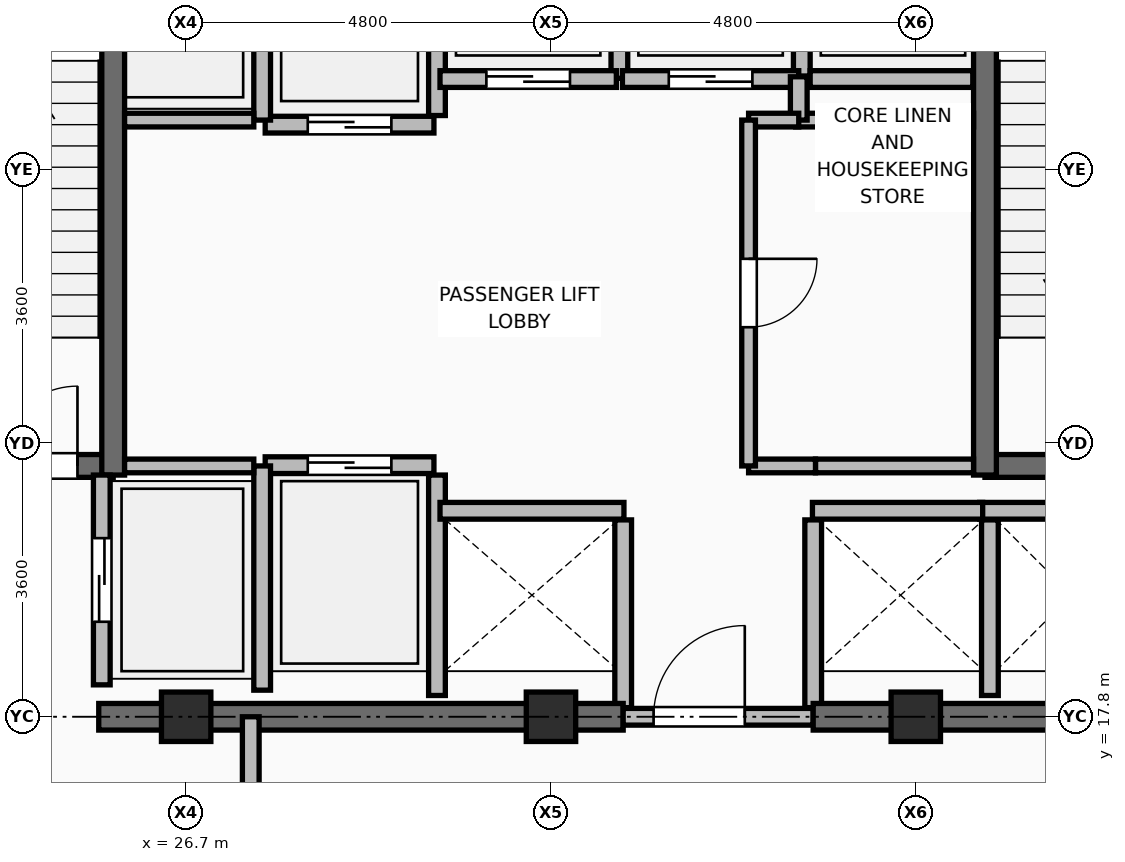
"""IFC4 building model, lengths in metres.
Left out: names, types, materials, properties, quantities, classifications, styles, units other than length and angle.
Written with IfcOpenShell. Run it as: python <this file> out.ifc"""

import sys

from ifc_helpers import new_model, si_unit, direction, frame, frame_2d, origin, origin_2d, place, context, subcontext, project, spatial, rectangle, extrude, element, fill, save


model = new_model("IFC4")
c1 = context("Model", 3, precision=1e-05, world=origin(), true_north=direction((0.0, 1.0)))
c2 = subcontext(c1, "Body", "Model", "MODEL_VIEW")
j1 = project(units=[si_unit("LENGTHUNIT", "METRE"), si_unit("PLANEANGLEUNIT", "RADIAN")], contexts=[c1])
p1 = place(None, origin())
s1 = spatial("IfcSite", under=j1, at=p1, CompositionType="ELEMENT")
p2 = place(p1, origin())
s2 = spatial("IfcBuilding", under=s1, at=p2, CompositionType="ELEMENT")
p3 = place(p2, frame((0.0, 0.0, 259.05)))
s3 = spatial("IfcBuildingStorey", under=s2, at=p3, CompositionType="ELEMENT", Elevation=259.05)
for number, where, z_axis, x_axis in (
    (1, (26.7, 17.8, 0.0), (0.0, 0.0, 1.0), (1.0, 0.0, 0.0)),
    (2, (31.5, 17.8, 0.0), (0.0, 0.0, 1.0), (1.0, 0.0, 0.0)),
    (3, (36.3, 17.8, 0.0), (0.0, 0.0, 1.0), (1.0, 0.0, 0.0)),
):
    element("IfcColumn", number, at=place(p3, frame(where, z_axis=z_axis, x_axis=x_axis)), inside=s3, PredefinedType="COLUMN", context=c2, shape_type="SweptSolid", body=[
        extrude(rectangle(XDim=0.65, YDim=0.65, at=origin_2d()), origin(), (0.0, 0.0, 1.0), 4.8),
    ])
p4 = place(p3, frame((30.0, 18.08, 0.0), z_axis=(0.0, 0.0, 1.0), x_axis=(0.0, 1.0, 0.0)))
e4 = element("IfcWall", 4, at=p4, inside=s3, PredefinedType="PARTITIONING", context=c2, shape_type="SweptSolid", body=[
    extrude(rectangle(XDim=2.9, YDim=0.22, at=frame_2d((1.45, 0.0))), origin(), (0.0, 0.0, 1.0), 4.595),
])
for number, where, z_axis, x_axis in (
    (5, (32.45, 17.92, 0.0), (0.0, 0.0, 1.0), (0.0, 1.0, 0.0)),
    (6, (34.95, 17.92, 0.0), (0.0, 0.0, 1.0), (0.0, 1.0, 0.0)),
):
    element("IfcWall", number, at=place(p3, frame(where, z_axis=z_axis, x_axis=x_axis)), inside=s3, PredefinedType="PARTITIONING", context=c2, shape_type="SweptSolid", body=[
        extrude(rectangle(XDim=2.47, YDim=0.22, at=frame_2d((1.235, 0.0))), origin(), (0.0, 0.0, 1.0), 4.595),
    ])
p5 = place(p3, frame((37.275, 18.08, 0.0), z_axis=(0.0, 0.0, 1.0), x_axis=(0.0, 1.0, 0.0)))
e7 = element("IfcWall", 7, at=p5, inside=s3, PredefinedType="PARTITIONING", context=c2, shape_type="SweptSolid", body=[
    extrude(rectangle(XDim=2.31, YDim=0.22, at=frame_2d((1.155, 0.0))), origin(), (0.0, 0.0, 1.0), 4.595),
])
p6 = place(p3, frame((30.0, 25.71, 0.0), z_axis=(0.0, 0.0, 1.0), x_axis=(0.0, 1.0, 0.0)))
e8 = element("IfcWall", 8, at=p6, inside=s3, PredefinedType="PARTITIONING", context=c2, shape_type="SweptSolid", body=[
    extrude(rectangle(XDim=2.73, YDim=0.22, at=frame_2d((1.365, 0.0))), origin(), (0.0, 0.0, 1.0), 4.595),
])
p7 = place(p3, frame((32.4, 26.2, 0.0), z_axis=(0.0, 0.0, 1.0), x_axis=(0.0, 1.0, 0.0)))
e9 = element("IfcWall", 9, at=p7, inside=s3, PredefinedType="PARTITIONING", context=c2, shape_type="SweptSolid", body=[
    extrude(rectangle(XDim=2.24, YDim=0.22, at=frame_2d((1.12, 0.0))), origin(), (0.0, 0.0, 1.0), 4.595),
])
p8 = place(p3, frame((34.8, 26.23, 0.0), z_axis=(0.0, 0.0, 1.0), x_axis=(0.0, 1.0, 0.0)))
e10 = element("IfcWall", 10, at=p8, inside=s3, PredefinedType="PARTITIONING", context=c2, shape_type="SweptSolid", body=[
    extrude(rectangle(XDim=2.21, YDim=0.22, at=frame_2d((1.105, 0.0))), origin(), (0.0, 0.0, 1.0), 4.595),
])
p9 = place(p3, frame((34.91, 26.19, 0.0), z_axis=(0.0, 0.0, 1.0), x_axis=(1.0, 0.0, 0.0)))
e11 = element("IfcWall", 11, at=p9, inside=s3, PredefinedType="PARTITIONING", context=c2, shape_type="SweptSolid", body=[
    extrude(rectangle(XDim=2.14, YDim=0.22, at=frame_2d((1.07, 0.0))), origin(), (0.0, 0.0, 1.0), 4.595),
])
p10 = place(p3, frame((25.55, 17.8, 0.0), z_axis=(0.0, 0.0, 1.0), x_axis=(1.0, 0.0, 0.0)))
e12 = element("IfcWall", 12, at=p10, inside=s3, PredefinedType="SHEAR", context=c2, shape_type="SweptSolid", body=[
    extrude(rectangle(XDim=6.9, YDim=0.35, at=frame_2d((3.45, 0.0))), origin(), (0.0, 0.0, 1.0), 4.62),
])
p11 = place(p3, frame((32.45, 17.8, 0.0), z_axis=(0.0, 0.0, 1.0), x_axis=(1.0, 0.0, 0.0)))
e13 = element("IfcWall", 13, at=p11, inside=s3, PredefinedType="PARTITIONING", context=c2, shape_type="SweptSolid", body=[
    extrude(rectangle(XDim=2.5, YDim=0.22, at=frame_2d((1.25, 0.0))), origin(), (0.0, 0.0, 1.0), 4.182),
])
p12 = place(p11, frame((0.4, 0.0, 0.0)))
e14 = element("IfcOpeningElement", 14, at=p12, cuts=e13, PredefinedType="OPENING", context=c2, shape_type="SweptSolid", body=[
    extrude(rectangle(XDim=1.2, YDim=2.1, at=frame_2d((0.6, 1.05))), frame((0.0, 0.12, 0.0), z_axis=(0.0, -1.0, 0.0), x_axis=(1.0, 0.0, 0.0)), (0.0, 0.0, 1.0), 0.24),
])
p13 = place(p3, frame((34.95, 17.8, 0.0), z_axis=(0.0, 0.0, 1.0), x_axis=(1.0, 0.0, 0.0)))
e15 = element("IfcWall", 15, at=p13, inside=s3, PredefinedType="SHEAR", context=c2, shape_type="SweptSolid", body=[
    extrude(rectangle(XDim=6.325, YDim=0.35, at=frame_2d((3.163, 0.0))), origin(), (0.0, 0.0, 1.0), 4.62),
])
p14 = place(p3, frame((22.075, 21.1, 0.0), z_axis=(0.0, 0.0, 1.0), x_axis=(1.0, 0.0, 0.0)))
e16 = element("IfcWall", 16, at=p14, inside=s3, PredefinedType="SHEAR", context=c2, shape_type="SweptSolid", body=[
    extrude(rectangle(XDim=3.665, YDim=0.3, at=frame_2d((1.833, 0.0))), origin(), (0.0, 0.0, 1.0), 4.62),
])
p15 = place(p14, frame((2.145, 0.0, 0.0)))
e17 = element("IfcOpeningElement", 17, at=p15, cuts=e16, PredefinedType="OPENING", context=c2, shape_type="SweptSolid", body=[
    extrude(rectangle(XDim=1.05, YDim=2.1, at=frame_2d((0.525, 1.05))), frame((0.0, 0.16, 0.0), z_axis=(0.0, -1.0, 0.0), x_axis=(1.0, 0.0, 0.0)), (0.0, 0.0, 1.0), 0.32),
])
p16 = place(p3, frame((25.74, 20.98, 0.0), z_axis=(0.0, 0.0, 1.0), x_axis=(0.0, 1.0, 0.0)))
e18 = element("IfcWall", 18, at=p16, inside=s3, PredefinedType="SHEAR", context=c2, shape_type="SweptSolid", body=[
    extrude(rectangle(XDim=7.99, YDim=0.3, at=frame_2d((3.995, 0.0))), origin(), (0.0, 0.0, 1.0), 4.62),
])
p17 = place(p3, frame((37.21, 21.1, 0.0), z_axis=(0.0, 0.0, 1.0), x_axis=(1.0, 0.0, 0.0)))
e19 = element("IfcWall", 19, at=p17, inside=s3, PredefinedType="SHEAR", context=c2, shape_type="SweptSolid", body=[
    extrude(rectangle(XDim=3.715, YDim=0.3, at=frame_2d((1.857, 0.0))), origin(), (0.0, 0.0, 1.0), 4.62),
])
p18 = place(p3, frame((37.21, 20.98, 0.0), z_axis=(0.0, 0.0, 1.0), x_axis=(0.0, 1.0, 0.0)))
e20 = element("IfcWall", 20, at=p18, inside=s3, PredefinedType="SHEAR", context=c2, shape_type="SweptSolid", body=[
    extrude(rectangle(XDim=7.99, YDim=0.3, at=frame_2d((3.995, 0.0))), origin(), (0.0, 0.0, 1.0), 4.62),
])
p19 = place(p3, frame((25.59, 18.22, 0.0), z_axis=(0.0, 0.0, 1.0), x_axis=(0.0, 1.0, 0.0)))
e21 = element("IfcWall", 21, at=p19, inside=s3, PredefinedType="PARTITIONING", context=c2, shape_type="SweptSolid", body=[
    extrude(rectangle(XDim=2.76, YDim=0.22, at=frame_2d((1.38, 0.0))), origin(), (0.0, 0.0, 1.0), 4.6),
])
p20 = place(p19, frame((0.83, 0.0, 0.0)))
e22 = element("IfcOpeningElement", 22, at=p20, cuts=e21, PredefinedType="OPENING", context=c2, shape_type="SweptSolid", body=[
    extrude(rectangle(XDim=1.1, YDim=2.2, at=frame_2d((0.55, 1.1))), frame((0.0, 0.12, 0.0), z_axis=(0.0, -1.0, 0.0), x_axis=(1.0, 0.0, 0.0)), (0.0, 0.0, 1.0), 0.24),
])
p21 = place(p3, frame((27.74, 21.11, 0.0), z_axis=(0.0, 0.0, 1.0), x_axis=(1.0, 0.0, 0.0)))
e23 = element("IfcWall", 23, at=p21, inside=s3, PredefinedType="PARTITIONING", context=c2, shape_type="SweptSolid", body=[
    extrude(rectangle(XDim=2.22, YDim=0.22, at=frame_2d((1.11, 0.0))), origin(), (0.0, 0.0, 1.0), 4.6),
])
p22 = place(p21, frame((0.56, 0.0, 0.0)))
e24 = element("IfcOpeningElement", 24, at=p22, cuts=e23, PredefinedType="OPENING", context=c2, shape_type="SweptSolid", body=[
    extrude(rectangle(XDim=1.1, YDim=2.2, at=frame_2d((0.55, 1.1))), frame((0.0, 0.12, 0.0), z_axis=(0.0, -1.0, 0.0), x_axis=(1.0, 0.0, 0.0)), (0.0, 0.0, 1.0), 0.24),
])
p23 = place(p3, frame((27.74, 25.59, 0.0), z_axis=(0.0, 0.0, 1.0), x_axis=(1.0, 0.0, 0.0)))
e25 = element("IfcWall", 25, at=p23, inside=s3, PredefinedType="PARTITIONING", context=c2, shape_type="SweptSolid", body=[
    extrude(rectangle(XDim=2.22, YDim=0.22, at=frame_2d((1.11, 0.0))), origin(), (0.0, 0.0, 1.0), 4.6),
])
p24 = place(p23, frame((0.56, 0.0, 0.0)))
e26 = element("IfcOpeningElement", 26, at=p24, cuts=e25, PredefinedType="OPENING", context=c2, shape_type="SweptSolid", body=[
    extrude(rectangle(XDim=1.1, YDim=2.2, at=frame_2d((0.55, 1.1))), frame((0.0, 0.12, 0.0), z_axis=(0.0, -1.0, 0.0), x_axis=(1.0, 0.0, 0.0)), (0.0, 0.0, 1.0), 0.24),
])
p25 = place(p3, frame((30.04, 20.51, 0.0), z_axis=(0.0, 0.0, 1.0), x_axis=(1.0, 0.0, 0.0)))
e27 = element("IfcWall", 27, at=p25, inside=s3, PredefinedType="PARTITIONING", context=c2, shape_type="SweptSolid", body=[
    extrude(rectangle(XDim=2.42, YDim=0.22, at=frame_2d((1.21, 0.0))), origin(), (0.0, 0.0, 1.0), 4.6),
])
for number, where, z_axis, x_axis in (
    (28, (37.14, 20.51, 0.0), (0.0, 0.0, 1.0), (1.0, 0.0, 0.0)),
    (29, (34.94, 20.51, 0.0), (0.0, 0.0, 1.0), (1.0, 0.0, 0.0)),
):
    element("IfcWall", number, at=place(p3, frame(where, z_axis=z_axis, x_axis=x_axis)), inside=s3, PredefinedType="PARTITIONING", context=c2, shape_type="SweptSolid", body=[
        extrude(rectangle(XDim=2.24, YDim=0.22, at=frame_2d((1.12, 0.0))), origin(), (0.0, 0.0, 1.0), 4.6),
    ])
p26 = place(p3, frame((30.04, 26.19, 0.0), z_axis=(0.0, 0.0, 1.0), x_axis=(1.0, 0.0, 0.0)))
e30 = element("IfcWall", 30, at=p26, inside=s3, PredefinedType="PARTITIONING", context=c2, shape_type="SweptSolid", body=[
    extrude(rectangle(XDim=2.32, YDim=0.22, at=frame_2d((1.16, 0.0))), origin(), (0.0, 0.0, 1.0), 4.6),
])
p27 = place(p26, frame((0.61, 0.0, 0.0)))
e31 = element("IfcOpeningElement", 31, at=p27, cuts=e30, PredefinedType="OPENING", context=c2, shape_type="SweptSolid", body=[
    extrude(rectangle(XDim=1.1, YDim=2.2, at=frame_2d((0.55, 1.1))), frame((0.0, 0.12, 0.0), z_axis=(0.0, -1.0, 0.0), x_axis=(1.0, 0.0, 0.0)), (0.0, 0.0, 1.0), 0.24),
])
p28 = place(p3, frame((32.44, 26.19, 0.0), z_axis=(0.0, 0.0, 1.0), x_axis=(1.0, 0.0, 0.0)))
e32 = element("IfcWall", 32, at=p28, inside=s3, PredefinedType="PARTITIONING", context=c2, shape_type="SweptSolid", body=[
    extrude(rectangle(XDim=2.32, YDim=0.22, at=frame_2d((1.16, 0.0))), origin(), (0.0, 0.0, 1.0), 4.6),
])
p29 = place(p28, frame((0.61, 0.0, 0.0)))
e33 = element("IfcOpeningElement", 33, at=p29, cuts=e32, PredefinedType="OPENING", context=c2, shape_type="SweptSolid", body=[
    extrude(rectangle(XDim=1.1, YDim=2.2, at=frame_2d((0.55, 1.1))), frame((0.0, 0.12, 0.0), z_axis=(0.0, -1.0, 0.0), x_axis=(1.0, 0.0, 0.0)), (0.0, 0.0, 1.0), 0.24),
])
p30 = place(p3, frame((27.7, 18.15, 0.0), z_axis=(0.0, 0.0, 1.0), x_axis=(0.0, 1.0, 0.0)))
e34 = element("IfcWall", 34, at=p30, inside=s3, PredefinedType="PARTITIONING", context=c2, shape_type="SweptSolid", body=[
    extrude(rectangle(XDim=2.95, YDim=0.22, at=frame_2d((1.475, 0.0))), origin(), (0.0, 0.0, 1.0), 4.6),
])
p31 = place(p3, frame((27.7, 25.65, 0.0), z_axis=(0.0, 0.0, 1.0), x_axis=(0.0, 1.0, 0.0)))
e35 = element("IfcWall", 35, at=p31, inside=s3, PredefinedType="PARTITIONING", context=c2, shape_type="SweptSolid", body=[
    extrude(rectangle(XDim=3.0, YDim=0.22, at=frame_2d((1.5, 0.0))), origin(), (0.0, 0.0, 1.0), 4.6),
])
for number, where, z_axis, x_axis in (
    (36, (25.89, 21.1, 0.0), (0.0, 0.0, 1.0), (1.0, 0.0, 0.0)),
    (37, (25.89, 25.65, 0.0), (0.0, 0.0, 1.0), (1.0, 0.0, 0.0)),
):
    element("IfcWall", number, at=place(p3, frame(where, z_axis=z_axis, x_axis=x_axis)), inside=s3, PredefinedType="PARTITIONING", context=c2, shape_type="SweptSolid", body=[
        extrude(rectangle(XDim=1.7, YDim=0.18, at=frame_2d((0.85, 0.0))), origin(), (0.0, 0.0, 1.0), 4.6),
    ])
p32 = place(p3, frame((34.98, 21.1, 0.0), z_axis=(0.0, 0.0, 1.0), x_axis=(1.0, 0.0, 0.0)))
e38 = element("IfcWall", 38, at=p32, inside=s3, PredefinedType="PARTITIONING", context=c2, shape_type="SweptSolid", body=[
    extrude(rectangle(XDim=2.08, YDim=0.18, at=frame_2d((1.04, 0.0))), origin(), (0.0, 0.0, 1.0), 4.6),
])
p33 = place(p3, frame((34.72, 25.65, 0.0), z_axis=(0.0, 0.0, 1.0), x_axis=(1.0, 0.0, 0.0)))
e39 = element("IfcWall", 39, at=p33, inside=s3, PredefinedType="PARTITIONING", context=c2, shape_type="SweptSolid", body=[
    extrude(rectangle(XDim=2.34, YDim=0.18, at=frame_2d((1.17, 0.0))), origin(), (0.0, 0.0, 1.0), 4.6),
])
p34 = place(p3, frame((34.76, 25.65, 0.0), z_axis=(0.0, 0.0, 1.0), x_axis=(0.0, 1.0, 0.0)))
e40 = element("IfcWall", 40, at=p34, inside=s3, PredefinedType="PARTITIONING", context=c2, shape_type="SweptSolid", body=[
    extrude(rectangle(XDim=0.57, YDim=0.22, at=frame_2d((0.285, 0.0))), origin(), (0.0, 0.0, 1.0), 4.6),
])
p35 = place(p3, frame((34.1, 21.1, 0.0), z_axis=(0.0, 0.0, 1.0), x_axis=(1.0, 0.0, 0.0)))
e41 = element("IfcWall", 41, at=p35, inside=s3, PredefinedType="PARTITIONING", context=c2, shape_type="SweptSolid", body=[
    extrude(rectangle(XDim=0.88, YDim=0.18, at=frame_2d((0.44, 0.0))), origin(), (0.0, 0.0, 1.0), 4.6),
])
p36 = place(p3, frame((34.1, 25.65, 0.0), z_axis=(0.0, 0.0, 1.0), x_axis=(1.0, 0.0, 0.0)))
e42 = element("IfcWall", 42, at=p36, inside=s3, PredefinedType="PARTITIONING", context=c2, shape_type="SweptSolid", body=[
    extrude(rectangle(XDim=0.66, YDim=0.18, at=frame_2d((0.33, 0.0))), origin(), (0.0, 0.0, 1.0), 4.6),
])
p37 = place(p3, frame((34.1, 21.1, 0.0), z_axis=(0.0, 0.0, 1.0), x_axis=(0.0, 1.0, 0.0)))
e43 = element("IfcWall", 43, at=p37, inside=s3, PredefinedType="PARTITIONING", context=c2, shape_type="SweptSolid", body=[
    extrude(rectangle(XDim=4.55, YDim=0.18, at=frame_2d((2.275, 0.0))), origin(), (0.0, 0.0, 1.0), 4.6),
])
p38 = place(p37, frame((1.825, 0.0, 0.0)))
e44 = element("IfcOpeningElement", 44, at=p38, cuts=e43, PredefinedType="OPENING", context=c2, shape_type="SweptSolid", body=[
    extrude(rectangle(XDim=0.9, YDim=2.1, at=frame_2d((0.45, 1.05))), frame((0.0, 0.1, 0.0), z_axis=(0.0, -1.0, 0.0), x_axis=(1.0, 0.0, 0.0)), (0.0, 0.0, 1.0), 0.2),
])
p39 = place(p3, frame((27.55, 14.35, 0.0), z_axis=(0.0, 0.0, 1.0), x_axis=(0.0, 1.0, 0.0)))
e45 = element("IfcWall", 45, at=p39, inside=s3, PredefinedType="PARTITIONING", context=c2, shape_type="SweptSolid", body=[
    extrude(rectangle(XDim=3.45, YDim=0.22, at=frame_2d((1.725, 0.0))), origin(), (0.0, 0.0, 1.0), 4.182),
])
p40 = place(p39, frame((1.175, 0.0, 0.0)))
e46 = element("IfcOpeningElement", 46, at=p40, cuts=e45, PredefinedType="OPENING", context=c2, shape_type="SweptSolid", body=[
    extrude(rectangle(XDim=1.1, YDim=2.1, at=frame_2d((0.55, 1.05))), frame((0.0, 0.12, 0.0), z_axis=(0.0, -1.0, 0.0), x_axis=(1.0, 0.0, 0.0)), (0.0, 0.0, 1.0), 0.24),
])
p41 = place(p12, origin())
e47 = element("IfcDoor", 47, at=p41, inside=s3, OperationType="SINGLE_SWING_RIGHT", PredefinedType="DOOR", context=c2, shape_type="SweptSolid", body=[
    extrude(rectangle(XDim=1.2, YDim=2.1, at=frame_2d((0.6, 1.05))), frame((0.0, 0.025, 0.0), z_axis=(0.0, -1.0, 0.0), x_axis=(1.0, 0.0, 0.0)), (0.0, 0.0, 1.0), 0.05),
])
fill(e14, e47)
p42 = place(p15, origin())
e48 = element("IfcDoor", 48, at=p42, inside=s3, OperationType="SINGLE_SWING_RIGHT", PredefinedType="DOOR", context=c2, shape_type="SweptSolid", body=[
    extrude(rectangle(XDim=1.05, YDim=2.1, at=frame_2d((0.525, 1.05))), frame((0.0, 0.025, 0.0), z_axis=(0.0, -1.0, 0.0), x_axis=(1.0, 0.0, 0.0)), (0.0, 0.0, 1.0), 0.05),
])
fill(e17, e48)
p43 = place(p20, origin())
e49 = element("IfcDoor", 49, at=p43, inside=s3, OperationType="DOUBLE_DOOR_SLIDING", PredefinedType="DOOR", context=c2, shape_type="SweptSolid", body=[
    extrude(rectangle(XDim=1.1, YDim=2.2, at=frame_2d((0.55, 1.1))), frame((0.0, 0.025, 0.0), z_axis=(0.0, -1.0, 0.0), x_axis=(1.0, 0.0, 0.0)), (0.0, 0.0, 1.0), 0.05),
])
fill(e22, e49)
p44 = place(p22, origin())
e50 = element("IfcDoor", 50, at=p44, inside=s3, OperationType="DOUBLE_DOOR_SLIDING", PredefinedType="DOOR", context=c2, shape_type="SweptSolid", body=[
    extrude(rectangle(XDim=1.1, YDim=2.2, at=frame_2d((0.55, 1.1))), frame((0.0, 0.025, 0.0), z_axis=(0.0, -1.0, 0.0), x_axis=(1.0, 0.0, 0.0)), (0.0, 0.0, 1.0), 0.05),
])
fill(e24, e50)
p45 = place(p24, frame((1.1, 0.0, 0.0), z_axis=(0.0, 0.0, 1.0), x_axis=(-1.0, 0.0, 0.0)))
e51 = element("IfcDoor", 51, at=p45, inside=s3, OperationType="DOUBLE_DOOR_SLIDING", PredefinedType="DOOR", context=c2, shape_type="SweptSolid", body=[
    extrude(rectangle(XDim=1.1, YDim=2.2, at=frame_2d((0.55, 1.1))), frame((0.0, 0.025, 0.0), z_axis=(0.0, -1.0, 0.0), x_axis=(1.0, 0.0, 0.0)), (0.0, 0.0, 1.0), 0.05),
])
fill(e26, e51)
p46 = place(p27, frame((1.1, 0.0, 0.0), z_axis=(0.0, 0.0, 1.0), x_axis=(-1.0, 0.0, 0.0)))
e52 = element("IfcDoor", 52, at=p46, inside=s3, OperationType="DOUBLE_DOOR_SLIDING", PredefinedType="DOOR", context=c2, shape_type="SweptSolid", body=[
    extrude(rectangle(XDim=1.1, YDim=2.2, at=frame_2d((0.55, 1.1))), frame((0.0, 0.025, 0.0), z_axis=(0.0, -1.0, 0.0), x_axis=(1.0, 0.0, 0.0)), (0.0, 0.0, 1.0), 0.05),
])
fill(e31, e52)
p47 = place(p29, frame((1.1, 0.0, 0.0), z_axis=(0.0, 0.0, 1.0), x_axis=(-1.0, 0.0, 0.0)))
e53 = element("IfcDoor", 53, at=p47, inside=s3, OperationType="DOUBLE_DOOR_SLIDING", PredefinedType="DOOR", context=c2, shape_type="SweptSolid", body=[
    extrude(rectangle(XDim=1.1, YDim=2.2, at=frame_2d((0.55, 1.1))), frame((0.0, 0.025, 0.0), z_axis=(0.0, -1.0, 0.0), x_axis=(1.0, 0.0, 0.0)), (0.0, 0.0, 1.0), 0.05),
])
fill(e33, e53)
p48 = place(p38, frame((0.9, 0.0, 0.0), z_axis=(0.0, 0.0, 1.0), x_axis=(-1.0, 0.0, 0.0)))
e54 = element("IfcDoor", 54, at=p48, inside=s3, OperationType="SINGLE_SWING_LEFT", PredefinedType="DOOR", context=c2, shape_type="SweptSolid", body=[
    extrude(rectangle(XDim=0.9, YDim=2.1, at=frame_2d((0.45, 1.05))), frame((0.0, 0.025, 0.0), z_axis=(0.0, -1.0, 0.0), x_axis=(1.0, 0.0, 0.0)), (0.0, 0.0, 1.0), 0.05),
])
fill(e44, e54)
save(model, sys.argv[1])
